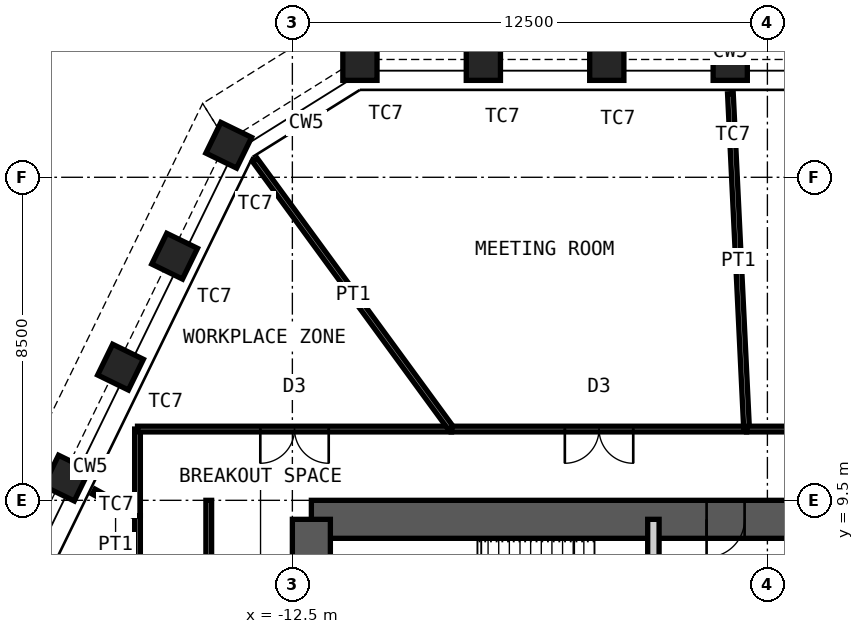
"""IFC4 building model, lengths in metres.
Left out: names, types, materials, properties, quantities, classifications, styles, units other than length and angle.
Written with IfcOpenShell. Run it as: python <this file> out.ifc"""

import sys

from ifc_helpers import new_model, si_unit, direction, frame, frame_2d, origin, origin_2d, place, context, subcontext, project, spatial, rectangle, hollow_rectangle, extrude, element, fill, save


model = new_model("IFC4")
c1 = context("Model", 3, precision=1e-05, world=origin(), true_north=direction((0.0, 1.0)))
c2 = subcontext(c1, "Body", "Model", "MODEL_VIEW")
j1 = project(units=[si_unit("LENGTHUNIT", "METRE"), si_unit("PLANEANGLEUNIT", "RADIAN")], contexts=[c1])
p1 = place(None, origin())
s1 = spatial("IfcSite", under=j1, at=p1, CompositionType="ELEMENT")
p2 = place(p1, origin())
s2 = spatial("IfcBuilding", under=s1, at=p2, CompositionType="ELEMENT")
p3 = place(p2, frame((0.0, 0.0, 299.8)))
s3 = spatial("IfcBuildingStorey", under=s2, at=p3, CompositionType="ELEMENT", Elevation=299.8)
for number, where, z_axis, x_axis in (
    (1, (-10.722, 21.0, 0.0), (0.0, 0.0, 1.0), (-1.0, 0.0, 0.0)),
    (2, (-7.474, 21.0, 0.0), (0.0, 0.0, 1.0), (-1.0, 0.0, 0.0)),
    (3, (-4.226, 21.0, 0.0), (0.0, 0.0, 1.0), (-1.0, 0.0, 0.0)),
    (4, (-0.978, 21.0, 0.0), (0.0, 0.0, 1.0), (-1.0, 0.0, 0.0)),
    (5, (-18.446, 10.085, 0.0), (0.0, 0.0, 1.0), (-0.438, -0.899, 0.0)),
    (6, (-17.022, 13.004, 0.0), (0.0, 0.0, 1.0), (-0.438, -0.899, 0.0)),
    (7, (-15.598, 15.924, 0.0), (0.0, 0.0, 1.0), (-0.438, -0.899, 0.0)),
    (8, (-14.174, 18.843, 0.0), (0.0, 0.0, 1.0), (-0.438, -0.899, 0.0)),
):
    element("IfcColumn", number, at=place(p3, frame(where, z_axis=z_axis, x_axis=x_axis)), inside=s3, PredefinedType="COLUMN", context=c2, shape_type="SweptSolid", body=[
        extrude(hollow_rectangle(XDim=0.9, YDim=0.9, WallThickness=0.06, at=origin_2d()), origin(), (0.0, 0.0, 1.0), 4.2),
    ])
p4 = place(p3, frame((-12.0, 9.0, 0.0), z_axis=(0.0, 0.0, 1.0), x_axis=(1.0, 0.0, 0.0)))
e9 = element("IfcWall", 9, at=p4, inside=s3, PredefinedType="SHEAR", context=c2, shape_type="SweptSolid", body=[
    extrude(rectangle(XDim=24.0, YDim=1.0, at=frame_2d((12.0, 0.0))), origin(), (0.0, 0.0, 1.0), 4.2),
])
p5 = place(p4, frame((10.4, 0.0, 0.0)))
e10 = element("IfcOpeningElement", 10, at=p5, cuts=e9, PredefinedType="OPENING", context=c2, shape_type="SweptSolid", body=[
    extrude(rectangle(XDim=1.0, YDim=2.1, at=frame_2d((0.5, 1.05))), frame((0.0, 0.51, 0.0), z_axis=(0.0, -1.0, 0.0), x_axis=(1.0, 0.0, 0.0)), (0.0, 0.0, 1.0), 1.02),
])
p6 = place(p4, frame((17.6, 0.0, 0.0)))
e11 = element("IfcOpeningElement", 11, at=p6, cuts=e9, PredefinedType="OPENING", context=c2, shape_type="SweptSolid", body=[
    extrude(rectangle(XDim=0.9, YDim=2.1, at=frame_2d((0.45, 1.05))), frame((0.0, 0.51, 0.0), z_axis=(0.0, -1.0, 0.0), x_axis=(1.0, 0.0, 0.0)), (0.0, 0.0, 1.0), 1.02),
])
p7 = place(p4, frame((21.9, 0.0, 0.0)))
e12 = element("IfcOpeningElement", 12, at=p7, cuts=e9, PredefinedType="OPENING", context=c2, shape_type="SweptSolid", body=[
    extrude(rectangle(XDim=0.9, YDim=2.1, at=frame_2d((0.45, 1.05))), frame((0.0, 0.51, 0.0), z_axis=(0.0, -1.0, 0.0), x_axis=(1.0, 0.0, 0.0)), (0.0, 0.0, 1.0), 1.02),
])
p8 = place(p3, frame((-12.0, -9.0, 0.0), z_axis=(0.0, 0.0, 1.0), x_axis=(0.0, 1.0, 0.0)))
e13 = element("IfcWall", 13, at=p8, inside=s3, PredefinedType="SHEAR", context=c2, shape_type="SweptSolid", body=[
    extrude(rectangle(XDim=18.0, YDim=1.0, at=frame_2d((9.0, 0.0))), origin(), (0.0, 0.0, 1.0), 4.2),
])
p9 = place(p8, frame((8.1, 0.0, 0.0)))
e14 = element("IfcOpeningElement", 14, at=p9, cuts=e13, PredefinedType="OPENING", context=c2, shape_type="SweptSolid", body=[
    extrude(rectangle(XDim=1.8, YDim=2.1, at=frame_2d((0.9, 1.05))), frame((0.0, 0.51, 0.0), z_axis=(0.0, -1.0, 0.0), x_axis=(1.0, 0.0, 0.0)), (0.0, 0.0, 1.0), 1.02),
])
p10 = place(p3, frame((-3.0, 5.15, 0.0), z_axis=(0.0, 0.0, 1.0), x_axis=(0.0, 1.0, 0.0)))
e15 = element("IfcWall", 15, at=p10, inside=s3, PredefinedType="PARTITIONING", context=c2, shape_type="SweptSolid", body=[
    extrude(rectangle(XDim=3.85, YDim=0.3, at=frame_2d((1.925, 0.0))), origin(), (0.0, 0.0, 1.0), 3.98),
])
p11 = place(p10, frame((1.425, 0.0, 0.0)))
e16 = element("IfcOpeningElement", 16, at=p11, cuts=e15, PredefinedType="OPENING", context=c2, shape_type="SweptSolid", body=[
    extrude(rectangle(XDim=1.0, YDim=2.1, at=frame_2d((0.5, 1.05))), frame((0.0, 0.16, 0.0), z_axis=(0.0, -1.0, 0.0), x_axis=(1.0, 0.0, 0.0)), (0.0, 0.0, 1.0), 0.32),
])
p12 = place(p3, frame((-17.729, 9.73, 0.0), z_axis=(0.0, 0.0, 1.0), x_axis=(0.87667364743, -0.481085559855, 0.0)))
e17 = element("IfcWall", 17, at=p12, inside=s3, PredefinedType="PARTITIONING", context=c2, shape_type="SweptSolid", body=[
    extrude(rectangle(XDim=1.316, YDim=0.15, at=frame_2d((0.658, 0.0))), origin(), (0.0, 0.0, 1.0), 2.93),
])
p13 = place(p3, frame((-16.575, 9.097, 0.0), z_axis=(0.0, 0.0, 1.0), x_axis=(0.0, 1.0, 0.0)))
e18 = element("IfcWall", 18, at=p13, inside=s3, PredefinedType="PARTITIONING", context=c2, shape_type="SweptSolid", body=[
    extrude(rectangle(XDim=2.278, YDim=0.15, at=frame_2d((1.139, 0.0))), origin(), (0.0, 0.0, 1.0), 4.03),
])
p14 = place(p3, frame((-16.575, 11.375, 0.0), z_axis=(0.0, 0.0, 1.0), x_axis=(1.0, 0.0, 0.0)))
e19 = element("IfcWall", 19, at=p14, inside=s3, PredefinedType="PARTITIONING", context=c2, shape_type="SweptSolid", body=[
    extrude(rectangle(XDim=8.263, YDim=0.15, at=frame_2d((4.131, 0.0))), origin(), (0.0, 0.0, 1.0), 4.03),
])
p15 = place(p14, frame((3.231, 0.0, 0.0)))
e20 = element("IfcOpeningElement", 20, at=p15, cuts=e19, PredefinedType="OPENING", context=c2, shape_type="SweptSolid", body=[
    extrude(rectangle(XDim=1.8, YDim=2.4, at=frame_2d((0.9, 1.2))), frame((0.0, 0.085, 0.0), z_axis=(0.0, -1.0, 0.0), x_axis=(1.0, 0.0, 0.0)), (0.0, 0.0, 1.0), 0.17),
])
p16 = place(p3, frame((-13.486, 18.455, 0.0), z_axis=(0.0, 0.0, 1.0), x_axis=(0.589997742419, -0.807404894672, 0.0)))
e21 = element("IfcWall", 21, at=p16, inside=s3, PredefinedType="PARTITIONING", context=c2, shape_type="SweptSolid", body=[
    extrude(rectangle(XDim=8.769, YDim=0.15, at=frame_2d((4.385, 0.0))), origin(), (0.0, 0.0, 1.0), 3.03),
])
p17 = place(p3, frame((-8.312, 11.375, 0.0), z_axis=(0.0, 0.0, 1.0), x_axis=(1.0, 0.0, 0.0)))
e22 = element("IfcWall", 22, at=p17, inside=s3, PredefinedType="PARTITIONING", context=c2, shape_type="SweptSolid", body=[
    extrude(rectangle(XDim=7.764, YDim=0.15, at=frame_2d((3.882, 0.0))), origin(), (0.0, 0.0, 1.0), 4.03),
])
p18 = place(p17, frame((2.982, 0.0, 0.0)))
e23 = element("IfcOpeningElement", 23, at=p18, cuts=e22, PredefinedType="OPENING", context=c2, shape_type="SweptSolid", body=[
    extrude(rectangle(XDim=1.8, YDim=2.4, at=frame_2d((0.9, 1.2))), frame((0.0, 0.085, 0.0), z_axis=(0.0, -1.0, 0.0), x_axis=(1.0, 0.0, 0.0)), (0.0, 0.0, 1.0), 0.17),
])
p19 = place(p3, frame((-0.973, 20.2, 0.0), z_axis=(0.0, 0.0, 1.0), x_axis=(0.048134910622, -0.998840843368, 0.0)))
e24 = element("IfcWall", 24, at=p19, inside=s3, PredefinedType="PARTITIONING", context=c2, shape_type="SweptSolid", body=[
    extrude(rectangle(XDim=8.835, YDim=0.15, at=frame_2d((4.418, 0.0))), origin(), (0.0, 0.0, 1.0), 2.93),
])
p20 = place(p3, frame((-0.548, 11.375, 0.0), z_axis=(0.0, 0.0, 1.0), x_axis=(1.0, 0.0, 0.0)))
e25 = element("IfcWall", 25, at=p20, inside=s3, PredefinedType="PARTITIONING", context=c2, shape_type="SweptSolid", body=[
    extrude(rectangle(XDim=13.923, YDim=0.15, at=frame_2d((6.961, 0.0))), origin(), (0.0, 0.0, 1.0), 4.03),
])
p21 = place(p20, frame((6.062, 0.0, 0.0)))
e26 = element("IfcOpeningElement", 26, at=p21, cuts=e25, PredefinedType="OPENING", context=c2, shape_type="SweptSolid", body=[
    extrude(rectangle(XDim=1.8, YDim=2.4, at=frame_2d((0.9, 1.2))), frame((0.0, 0.085, 0.0), z_axis=(0.0, -1.0, 0.0), x_axis=(1.0, 0.0, 0.0)), (0.0, 0.0, 1.0), 0.17),
])
p22 = place(p3, frame((-16.575, -4.377, 0.0), z_axis=(0.0, 0.0, 1.0), x_axis=(0.0, 1.0, 0.0)))
e27 = element("IfcWall", 27, at=p22, inside=s3, PredefinedType="PARTITIONING", context=c2, shape_type="SweptSolid", body=[
    extrude(rectangle(XDim=13.474, YDim=0.15, at=frame_2d((6.737, 0.0))), origin(), (0.0, 0.0, 1.0), 4.03),
])
p23 = place(p22, frame((5.837, 0.0, 0.0)))
e28 = element("IfcOpeningElement", 28, at=p23, cuts=e27, PredefinedType="OPENING", context=c2, shape_type="SweptSolid", body=[
    extrude(rectangle(XDim=1.8, YDim=2.4, at=frame_2d((0.9, 1.2))), frame((0.0, 0.085, 0.0), z_axis=(0.0, -1.0, 0.0), x_axis=(1.0, 0.0, 0.0)), (0.0, 0.0, 1.0), 0.17),
])
p24 = place(p3, frame((-14.7, 1.9, 0.0), z_axis=(0.0, 0.0, 1.0), x_axis=(0.0, 1.0, 0.0)))
e29 = element("IfcWall", 29, at=p24, inside=s3, PredefinedType="PARTITIONING", context=c2, shape_type="SweptSolid", body=[
    extrude(rectangle(XDim=7.6, YDim=0.15, at=frame_2d((3.8, 0.0))), origin(), (0.0, 0.0, 1.0), 4.03),
])
p25 = place(p5, origin())
e30 = element("IfcDoor", 30, at=p25, inside=s3, OperationType="SINGLE_SWING_LEFT", PredefinedType="DOOR", context=c2, shape_type="SweptSolid", body=[
    extrude(rectangle(XDim=1.0, YDim=2.1, at=frame_2d((0.5, 1.05))), frame((0.0, 0.025, 0.0), z_axis=(0.0, -1.0, 0.0), x_axis=(1.0, 0.0, 0.0)), (0.0, 0.0, 1.0), 0.05),
])
fill(e10, e30)
p26 = place(p15, origin())
e31 = element("IfcDoor", 31, at=p26, inside=s3, OperationType="DOUBLE_DOOR_DOUBLE_SWING", PredefinedType="DOOR", context=c2, shape_type="SweptSolid", body=[
    extrude(rectangle(XDim=1.8, YDim=2.4, at=frame_2d((0.9, 1.2))), frame((0.0, 0.025, 0.0), z_axis=(0.0, -1.0, 0.0), x_axis=(1.0, 0.0, 0.0)), (0.0, 0.0, 1.0), 0.05),
])
fill(e20, e31)
p27 = place(p18, origin())
e32 = element("IfcDoor", 32, at=p27, inside=s3, OperationType="DOUBLE_DOOR_DOUBLE_SWING", PredefinedType="DOOR", context=c2, shape_type="SweptSolid", body=[
    extrude(rectangle(XDim=1.8, YDim=2.4, at=frame_2d((0.9, 1.2))), frame((0.0, 0.025, 0.0), z_axis=(0.0, -1.0, 0.0), x_axis=(1.0, 0.0, 0.0)), (0.0, 0.0, 1.0), 0.05),
])
fill(e23, e32)
save(model, sys.argv[1])
